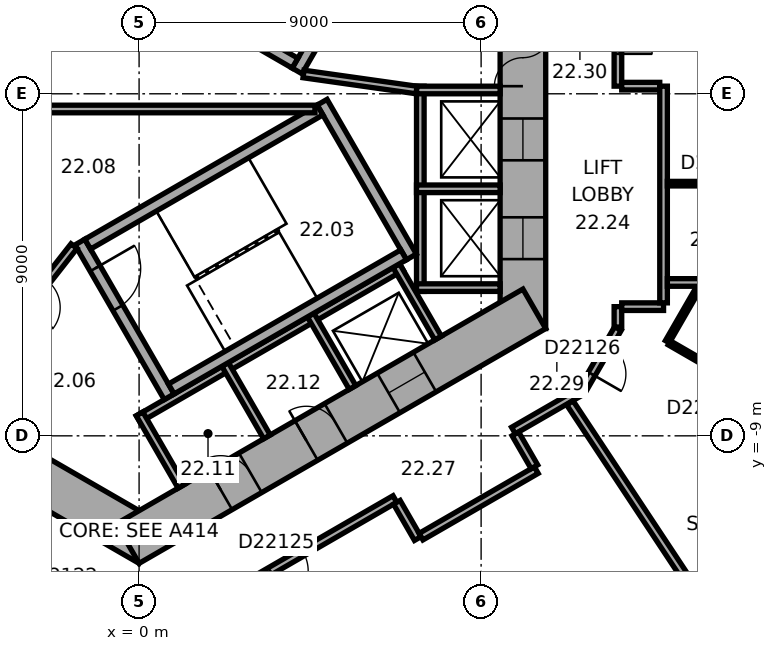
"""IFC4 building model, lengths in metres.
Left out: names, types, materials, properties, quantities, classifications, styles, units other than length and angle.
Written with IfcOpenShell. Run it as: python <this file> out.ifc"""

import sys

from ifc_helpers import new_model, si_unit, direction, frame, frame_2d, origin, place, context, subcontext, project, spatial, rectangle, extrude, element, fill, save


model = new_model("IFC4")
c1 = context("Model", 3, precision=1e-05, world=origin(), true_north=direction((0.0, 1.0)))
c2 = subcontext(c1, "Body", "Model", "MODEL_VIEW")
j1 = project(units=[si_unit("LENGTHUNIT", "METRE"), si_unit("PLANEANGLEUNIT", "RADIAN")], contexts=[c1])
p1 = place(None, origin())
s1 = spatial("IfcSite", under=j1, at=p1, CompositionType="ELEMENT")
p2 = place(p1, origin())
s2 = spatial("IfcBuilding", under=s1, at=p2, CompositionType="ELEMENT")
p3 = place(p2, frame((0.0, 0.0, 96.8)))
s3 = spatial("IfcBuildingStorey", under=s2, at=p3, CompositionType="ELEMENT", Elevation=96.8)
p4 = place(p3, frame((10.1, -6.177, 0.0), z_axis=(0.0, 0.0, 1.0), x_axis=(0.0, 1.0, 0.0)))
e1 = element("IfcWall", 1, at=p4, inside=s3, PredefinedType="SHEAR", context=c2, shape_type="SweptSolid", body=[
    extrude(rectangle(XDim=12.355, YDim=1.2, at=frame_2d((6.177, 0.0))), origin(), (0.0, 0.0, 1.0), 3.3),
])
p5 = place(p4, frame((6.378, 0.0, 0.0)))
e2 = element("IfcOpeningElement", 2, at=p5, cuts=e1, PredefinedType="OPENING", context=c2, shape_type="SweptSolid", body=[
    extrude(rectangle(XDim=1.5, YDim=2.1, at=frame_2d((0.75, 1.05))), frame((0.0, 0.61, 0.0), z_axis=(0.0, -1.0, 0.0), x_axis=(1.0, 0.0, 0.0)), (0.0, 0.0, 1.0), 1.22),
])
p6 = place(p4, frame((1.828, 0.0, 0.0)))
e3 = element("IfcOpeningElement", 3, at=p6, cuts=e1, PredefinedType="OPENING", context=c2, shape_type="SweptSolid", body=[
    extrude(rectangle(XDim=1.1, YDim=2.1, at=frame_2d((0.55, 1.05))), frame((0.0, 0.61, 0.0), z_axis=(0.0, -1.0, 0.0), x_axis=(1.0, 0.0, 0.0)), (0.0, 0.0, 1.0), 1.22),
])
p7 = place(p4, frame((4.427, 0.0, 0.0)))
e4 = element("IfcOpeningElement", 4, at=p7, cuts=e1, PredefinedType="OPENING", context=c2, shape_type="SweptSolid", body=[
    extrude(rectangle(XDim=1.1, YDim=2.1, at=frame_2d((0.55, 1.05))), frame((0.0, 0.61, 0.0), z_axis=(0.0, -1.0, 0.0), x_axis=(1.0, 0.0, 0.0)), (0.0, 0.0, 1.0), 1.22),
])
p8 = place(p3, frame((-10.4, -5.658, 0.0), z_axis=(0.0, 0.0, 1.0), x_axis=(0.866021384402, -0.500006961711, 0.0)))
e5 = element("IfcWall", 5, at=p8, inside=s3, PredefinedType="SHEAR", context=c2, shape_type="SweptSolid", body=[
    extrude(rectangle(XDim=12.355, YDim=1.2, at=frame_2d((6.178, 0.0))), origin(), (0.0, 0.0, 1.0), 3.3),
])
p9 = place(p8, frame((6.378, 0.0, 0.0)))
e6 = element("IfcOpeningElement", 6, at=p9, cuts=e5, PredefinedType="OPENING", context=c2, shape_type="SweptSolid", body=[
    extrude(rectangle(XDim=1.5, YDim=2.1, at=frame_2d((0.75, 1.05))), frame((0.0, 0.61, 0.0), z_axis=(0.0, -1.0, 0.0), x_axis=(1.0, 0.0, 0.0)), (0.0, 0.0, 1.0), 1.22),
])
p10 = place(p8, frame((3.228, 0.0, 0.0)))
e7 = element("IfcOpeningElement", 7, at=p10, cuts=e5, PredefinedType="OPENING", context=c2, shape_type="SweptSolid", body=[
    extrude(rectangle(XDim=0.9, YDim=2.1, at=frame_2d((0.45, 1.05))), frame((0.0, 0.61, 0.0), z_axis=(0.0, -1.0, 0.0), x_axis=(1.0, 0.0, 0.0)), (0.0, 0.0, 1.0), 1.22),
])
p11 = place(p3, frame((-0.3, -11.836, 0.0), z_axis=(0.0, 0.0, 1.0), x_axis=(0.866021384402, 0.500006961711, 0.0)))
e8 = element("IfcWall", 8, at=p11, inside=s3, PredefinedType="SHEAR", context=c2, shape_type="SweptSolid", body=[
    extrude(rectangle(XDim=12.355, YDim=1.2, at=frame_2d((6.178, 0.0))), origin(), (0.0, 0.0, 1.0), 3.3),
])
p12 = place(p11, frame((2.828, 0.0, 0.0)))
e9 = element("IfcOpeningElement", 9, at=p12, cuts=e8, PredefinedType="OPENING", context=c2, shape_type="SweptSolid", body=[
    extrude(rectangle(XDim=0.9, YDim=2.1, at=frame_2d((0.45, 1.05))), frame((0.0, 0.61, 0.0), z_axis=(0.0, -1.0, 0.0), x_axis=(1.0, 0.0, 0.0)), (0.0, 0.0, 1.0), 1.22),
])
p13 = place(p11, frame((5.428, 0.0, 0.0)))
e10 = element("IfcOpeningElement", 10, at=p13, cuts=e8, PredefinedType="OPENING", context=c2, shape_type="SweptSolid", body=[
    extrude(rectangle(XDim=0.9, YDim=2.1, at=frame_2d((0.45, 1.05))), frame((0.0, 0.61, 0.0), z_axis=(0.0, -1.0, 0.0), x_axis=(1.0, 0.0, 0.0)), (0.0, 0.0, 1.0), 1.22),
])
p14 = place(p11, frame((7.928, 0.0, 0.0)))
e11 = element("IfcOpeningElement", 11, at=p14, cuts=e8, PredefinedType="OPENING", context=c2, shape_type="SweptSolid", body=[
    extrude(rectangle(XDim=1.1, YDim=2.1, at=frame_2d((0.55, 1.05))), frame((0.0, 0.61, 0.0), z_axis=(0.0, -1.0, 0.0), x_axis=(1.0, 0.0, 0.0)), (0.0, 0.0, 1.0), 1.22),
])
p15 = place(p3, frame((7.4, -5.2, 0.0), z_axis=(0.0, 0.0, 1.0), x_axis=(0.0, 1.0, 0.0)))
e12 = element("IfcWall", 12, at=p15, inside=s3, PredefinedType="PARTITIONING", context=c2, shape_type="SweptSolid", body=[
    extrude(rectangle(XDim=5.4, YDim=0.2, at=frame_2d((2.7, 0.0))), origin(), (0.0, 0.0, 1.0), 3.05),
])
for number, where, z_axis, x_axis in (
    (13, (7.3, -5.1, 0.0), (0.0, 0.0, 1.0), (1.0, 0.0, 0.0)),
    (14, (7.3, -2.5, 0.0), (0.0, 0.0, 1.0), (1.0, 0.0, 0.0)),
    (15, (7.3, 0.1, 0.0), (0.0, 0.0, 1.0), (1.0, 0.0, 0.0)),
):
    element("IfcWall", number, at=place(p3, frame(where, z_axis=z_axis, x_axis=x_axis)), inside=s3, PredefinedType="PARTITIONING", context=c2, shape_type="SweptSolid", body=[
        extrude(rectangle(XDim=2.2, YDim=0.2, at=frame_2d((1.1, 0.0))), origin(), (0.0, 0.0, 1.0), 3.05),
    ])
p16 = place(p3, frame((-0.024, -8.559, 0.0), z_axis=(0.0, 0.0, 1.0), x_axis=(0.866026010844, 0.49999894854, 0.0)))
e16 = element("IfcWall", 16, at=p16, inside=s3, PredefinedType="PARTITIONING", context=c2, shape_type="SweptSolid", body=[
    extrude(rectangle(XDim=8.0, YDim=0.2, at=frame_2d((4.0, 0.0))), origin(), (0.0, 0.0, 1.0), 3.05),
])
for number, where, z_axis, x_axis in (
    (17, (0.013, -8.422, 0.0), (0.0, 0.0, 1.0), (0.5, -0.866, 0.0)),
    (18, (2.264, -7.122, 0.0), (0.0, 0.0, 1.0), (0.5, -0.866, 0.0)),
    (19, (4.516, -5.822, 0.0), (0.0, 0.0, 1.0), (0.5, -0.866, 0.0)),
    (20, (6.768, -4.522, 0.0), (0.0, 0.0, 1.0), (0.5, -0.866, 0.0)),
):
    element("IfcWall", number, at=place(p3, frame(where, z_axis=z_axis, x_axis=x_axis)), inside=s3, PredefinedType="PARTITIONING", context=c2, shape_type="SweptSolid", body=[
        extrude(rectangle(XDim=2.2, YDim=0.2, at=frame_2d((1.1, 0.0))), origin(), (0.0, 0.0, 1.0), 3.05),
    ])
p17 = place(p3, frame((4.158, 0.602, 0.0), z_axis=(0.0, 0.0, 1.0), x_axis=(0.499977259774, 0.866038532462, 0.0)))
e21 = element("IfcWall", 21, at=p17, inside=s3, PredefinedType="SHEAR", context=c2, shape_type="SweptSolid", body=[
    extrude(rectangle(XDim=4.7, YDim=0.3, at=frame_2d((2.35, 0.0))), origin(), (0.0, 0.0, 1.0), 3.05),
])
p18 = place(p17, frame((0.8, 0.0, 0.0)))
e22 = element("IfcOpeningElement", 22, at=p18, cuts=e21, PredefinedType="OPENING", context=c2, shape_type="SweptSolid", body=[
    extrude(rectangle(XDim=1.2, YDim=2.1, at=frame_2d((0.6, 1.05))), frame((0.0, 0.16, 0.0), z_axis=(0.0, -1.0, 0.0), x_axis=(1.0, 0.0, 0.0)), (0.0, 0.0, 1.0), 0.32),
])
p19 = place(p3, frame((4.103, 0.807, 0.0), z_axis=(0.0, 0.0, 1.0), x_axis=(-0.866027801685, 0.499995846692, 0.0)))
e23 = element("IfcWall", 23, at=p19, inside=s3, PredefinedType="SHEAR", context=c2, shape_type="SweptSolid", body=[
    extrude(rectangle(XDim=7.06, YDim=0.3, at=frame_2d((3.53, 0.0))), origin(), (0.0, 0.0, 1.0), 3.05),
])
p20 = place(p3, frame((-1.558, -3.902, 0.0), z_axis=(0.0, 0.0, 1.0), x_axis=(0.499977259774, -0.866038532462, 0.0)))
e24 = element("IfcWall", 24, at=p20, inside=s3, PredefinedType="SHEAR", context=c2, shape_type="SweptSolid", body=[
    extrude(rectangle(XDim=4.7, YDim=0.3, at=frame_2d((2.35, 0.0))), origin(), (0.0, 0.0, 1.0), 3.05),
])
p21 = place(p20, frame((0.8, 0.0, 0.0)))
e25 = element("IfcOpeningElement", 25, at=p21, cuts=e24, PredefinedType="OPENING", context=c2, shape_type="SweptSolid", body=[
    extrude(rectangle(XDim=1.2, YDim=2.1, at=frame_2d((0.6, 1.05))), frame((0.0, 0.16, 0.0), z_axis=(0.0, -1.0, 0.0), x_axis=(1.0, 0.0, 0.0)), (0.0, 0.0, 1.0), 0.32),
])
p22 = place(p3, frame((4.816, -0.222, 0.0), z_axis=(0.0, 0.0, 1.0), x_axis=(0.499977259774, -0.866038532462, 0.0)))
e26 = element("IfcWall", 26, at=p22, inside=s3, PredefinedType="SHEAR", context=c2, shape_type="SweptSolid", body=[
    extrude(rectangle(XDim=4.7, YDim=0.3, at=frame_2d((2.35, 0.0))), origin(), (0.0, 0.0, 1.0), 3.05),
])
for number, where, z_axis, x_axis in (
    (27, (-1.353, -3.957, 0.0), (0.0, 0.0, 1.0), (0.866, 0.5, 0.0)),
    (28, (0.847, -7.767, 0.0), (0.0, 0.0, 1.0), (0.866, 0.5, 0.0)),
):
    element("IfcWall", number, at=place(p3, frame(where, z_axis=z_axis, x_axis=x_axis)), inside=s3, PredefinedType="SHEAR", context=c2, shape_type="SweptSolid", body=[
        extrude(rectangle(XDim=7.06, YDim=0.3, at=frame_2d((3.53, 0.0))), origin(), (0.0, 0.0, 1.0), 3.05),
    ])
p23 = place(p3, frame((4.327, 0.521, 0.0), z_axis=(0.0, 0.0, 1.0), x_axis=(0.990124376366, -0.14019172346, 0.0)))
e29 = element("IfcWall", 29, at=p23, inside=s3, PredefinedType="PARTITIONING", context=c2, shape_type="SweptSolid", body=[
    extrude(rectangle(XDim=3.002, YDim=0.2, at=frame_2d((1.501, 0.0))), origin(), (0.0, 0.0, 1.0), 3.05),
])
p24 = place(p3, frame((-1.712, -4.008, 0.0), z_axis=(0.0, 0.0, 1.0), x_axis=(-0.616549420702, -0.787316208287, 0.0)))
e30 = element("IfcWall", 30, at=p24, inside=s3, PredefinedType="PARTITIONING", context=c2, shape_type="SweptSolid", body=[
    extrude(rectangle(XDim=3.002, YDim=0.2, at=frame_2d((1.501, 0.0))), origin(), (0.0, 0.0, 1.0), 3.05),
])
p25 = place(p24, frame((1.15, 0.0, 0.0)))
e31 = element("IfcOpeningElement", 31, at=p25, cuts=e30, PredefinedType="OPENING", context=c2, shape_type="SweptSolid", body=[
    extrude(rectangle(XDim=0.9, YDim=2.1, at=frame_2d((0.45, 1.05))), frame((0.0, 0.11, 0.0), z_axis=(0.0, -1.0, 0.0), x_axis=(1.0, 0.0, 0.0)), (0.0, 0.0, 1.0), 0.22),
])
p26 = place(p3, frame((-2.72, -0.4, 0.0), z_axis=(0.0, 0.0, 1.0), x_axis=(1.0, 0.0, 0.0)))
e32 = element("IfcWall", 32, at=p26, inside=s3, PredefinedType="PARTITIONING", context=c2, shape_type="SweptSolid", body=[
    extrude(rectangle(XDim=7.347, YDim=0.2, at=frame_2d((3.674, 0.0))), origin(), (0.0, 0.0, 1.0), 3.05),
])
p27 = place(p3, frame((-11.615, -7.843, 0.0), z_axis=(0.0, 0.0, 1.0), x_axis=(0.866026466995, -0.499998158461, 0.0)))
e33 = element("IfcWall", 33, at=p27, inside=s3, PredefinedType="PARTITIONING", context=c2, shape_type="SweptSolid", body=[
    extrude(rectangle(XDim=12.315, YDim=0.2, at=frame_2d((6.158, 0.0))), origin(), (0.0, 0.0, 1.0), 3.05),
])
p28 = place(p27, frame((3.333, 0.0, 0.0)))
e34 = element("IfcOpeningElement", 34, at=p28, cuts=e33, PredefinedType="OPENING", context=c2, shape_type="SweptSolid", body=[
    extrude(rectangle(XDim=0.9, YDim=2.1, at=frame_2d((0.45, 1.05))), frame((0.0, 0.11, 0.0), z_axis=(0.0, -1.0, 0.0), x_axis=(1.0, 0.0, 0.0)), (0.0, 0.0, 1.0), 0.22),
])
p29 = place(p27, frame((10.229, 0.0, 0.0)))
e35 = element("IfcOpeningElement", 35, at=p29, cuts=e33, PredefinedType="OPENING", context=c2, shape_type="SweptSolid", body=[
    extrude(rectangle(XDim=0.9, YDim=2.1, at=frame_2d((0.45, 1.05))), frame((0.0, 0.11, 0.0), z_axis=(0.0, -1.0, 0.0), x_axis=(1.0, 0.0, 0.0)), (0.0, 0.0, 1.0), 0.22),
])
p30 = place(p3, frame((1.033, -13.953, 0.0), z_axis=(0.0, 0.0, 1.0), x_axis=(0.866017531406, 0.500013635111, 0.0)))
e36 = element("IfcWall", 36, at=p30, inside=s3, PredefinedType="PARTITIONING", context=c2, shape_type="SweptSolid", body=[
    extrude(rectangle(XDim=6.58, YDim=0.2, at=frame_2d((3.29, 0.0))), origin(), (0.0, 0.0, 1.0), 3.05),
])
p31 = place(p30, frame((2.79, 0.0, 0.0)))
e37 = element("IfcOpeningElement", 37, at=p31, cuts=e36, PredefinedType="OPENING", context=c2, shape_type="SweptSolid", body=[
    extrude(rectangle(XDim=1.0, YDim=2.1, at=frame_2d((0.5, 1.05))), frame((0.0, 0.11, 0.0), z_axis=(0.0, -1.0, 0.0), x_axis=(1.0, 0.0, 0.0)), (0.0, 0.0, 1.0), 0.22),
])
p32 = place(p3, frame((6.782, -10.749, 0.0), z_axis=(0.0, 0.0, 1.0), x_axis=(0.500074377092, -0.865982457891, 0.0)))
e38 = element("IfcWall", 38, at=p32, inside=s3, PredefinedType="PARTITIONING", context=c2, shape_type="SweptSolid", body=[
    extrude(rectangle(XDim=1.101, YDim=0.2, at=frame_2d((0.55, 0.0))), origin(), (0.0, 0.0, 1.0), 3.05),
])
p33 = place(p3, frame((7.419, -11.653, 0.0), z_axis=(0.0, 0.0, 1.0), x_axis=(0.866038154057, 0.49997791523, 0.0)))
e39 = element("IfcWall", 39, at=p33, inside=s3, PredefinedType="PARTITIONING", context=c2, shape_type="SweptSolid", body=[
    extrude(rectangle(XDim=3.502, YDim=0.2, at=frame_2d((1.751, 0.0))), origin(), (0.0, 0.0, 1.0), 3.05),
])
p34 = place(p3, frame((9.852, -8.861, 0.0), z_axis=(0.0, 0.0, 1.0), x_axis=(0.866013291437, 0.500020978615, 0.0)))
e40 = element("IfcWall", 40, at=p34, inside=s3, PredefinedType="PARTITIONING", context=c2, shape_type="SweptSolid", body=[
    extrude(rectangle(XDim=2.077, YDim=0.2, at=frame_2d((1.038, 0.0))), origin(), (0.0, 0.0, 1.0), 3.05),
])
p35 = place(p3, frame((10.402, -9.815, 0.0), z_axis=(0.0, 0.0, 1.0), x_axis=(-0.499968756647, 0.866043441391, 0.0)))
e41 = element("IfcWall", 41, at=p35, inside=s3, PredefinedType="PARTITIONING", context=c2, shape_type="SweptSolid", body=[
    extrude(rectangle(XDim=1.001, YDim=0.2, at=frame_2d((0.5, 0.0))), origin(), (0.0, 0.0, 1.0), 3.05),
])
p36 = place(p3, frame((11.67, -7.788, 0.0), z_axis=(0.0, 0.0, 1.0), x_axis=(0.500063286585, 0.865988862174, 0.0)))
e42 = element("IfcWall", 42, at=p36, inside=s3, PredefinedType="PARTITIONING", context=c2, shape_type="SweptSolid", body=[
    extrude(rectangle(XDim=1.86, YDim=0.2, at=frame_2d((0.93, 0.0))), origin(), (0.0, 0.0, 1.0), 3.05),
])
p37 = place(p36, frame((0.48, 0.0, 0.0)))
e43 = element("IfcOpeningElement", 43, at=p37, cuts=e42, PredefinedType="OPENING", context=c2, shape_type="SweptSolid", body=[
    extrude(rectangle(XDim=0.9, YDim=2.1, at=frame_2d((0.45, 1.05))), frame((0.0, 0.11, 0.0), z_axis=(0.0, -1.0, 0.0), x_axis=(1.0, 0.0, 0.0)), (0.0, 0.0, 1.0), 0.22),
])
p38 = place(p3, frame((12.6, -6.138, 0.0), z_axis=(0.0, 0.0, 1.0), x_axis=(0.0, 1.0, 0.0)))
e44 = element("IfcWall", 44, at=p38, inside=s3, PredefinedType="PARTITIONING", context=c2, shape_type="SweptSolid", body=[
    extrude(rectangle(XDim=0.537, YDim=0.2, at=frame_2d((0.268, 0.0))), origin(), (0.0, 0.0, 1.0), 3.05),
])
p39 = place(p3, frame((12.6, 0.201, 0.0), z_axis=(0.0, 0.0, 1.0), x_axis=(0.0, 1.0, 0.0)))
e45 = element("IfcWall", 45, at=p39, inside=s3, PredefinedType="PARTITIONING", context=c2, shape_type="SweptSolid", body=[
    extrude(rectangle(XDim=2.604, YDim=0.2, at=frame_2d((1.302, 0.0))), origin(), (0.0, 0.0, 1.0), 3.05),
])
p40 = place(p39, frame((0.852, 0.0, 0.0)))
e46 = element("IfcOpeningElement", 46, at=p40, cuts=e45, PredefinedType="OPENING", context=c2, shape_type="SweptSolid", body=[
    extrude(rectangle(XDim=0.9, YDim=2.1, at=frame_2d((0.45, 1.05))), frame((0.0, 0.11, 0.0), z_axis=(0.0, -1.0, 0.0), x_axis=(1.0, 0.0, 0.0)), (0.0, 0.0, 1.0), 0.22),
])
p41 = place(p3, frame((12.7, -5.601, 0.0), z_axis=(0.0, 0.0, 1.0), x_axis=(1.0, 0.0, 0.0)))
e47 = element("IfcWall", 47, at=p41, inside=s3, PredefinedType="PARTITIONING", context=c2, shape_type="SweptSolid", body=[
    extrude(rectangle(XDim=1.101, YDim=0.2, at=frame_2d((0.551, 0.0))), origin(), (0.0, 0.0, 1.0), 3.05),
])
p42 = place(p3, frame((13.701, 0.201, 0.0), z_axis=(0.0, 0.0, 1.0), x_axis=(-1.0, 0.0, 0.0)))
e48 = element("IfcWall", 48, at=p42, inside=s3, PredefinedType="PARTITIONING", context=c2, shape_type="SweptSolid", body=[
    extrude(rectangle(XDim=1.001, YDim=0.2, at=frame_2d((0.5, 0.0))), origin(), (0.0, 0.0, 1.0), 3.05),
])
p43 = place(p3, frame((13.801, -5.501, 0.0), z_axis=(0.0, 0.0, 1.0), x_axis=(0.0, 1.0, 0.0)))
e49 = element("IfcWall", 49, at=p43, inside=s3, PredefinedType="PARTITIONING", context=c2, shape_type="SweptSolid", body=[
    extrude(rectangle(XDim=5.702, YDim=0.2, at=frame_2d((2.851, 0.0))), origin(), (0.0, 0.0, 1.0), 3.05),
])
p44 = place(p3, frame((13.901, -6.524, 0.0), z_axis=(0.0, 0.0, 1.0), x_axis=(0.499964162598, 0.86604609353, 0.0)))
e50 = element("IfcWall", 50, at=p44, inside=s3, PredefinedType="PARTITIONING", context=c2, shape_type="SweptSolid", body=[
    extrude(rectangle(XDim=1.661, YDim=0.12, at=frame_2d((0.831, 0.0))), origin(), (0.0, 0.0, 1.0), 3.05),
])
p45 = place(p3, frame((13.901, -4.965, 0.0), z_axis=(0.0, 0.0, 1.0), x_axis=(1.0, 0.0, 0.0)))
e51 = element("IfcWall", 51, at=p45, inside=s3, PredefinedType="PARTITIONING", context=c2, shape_type="SweptSolid", body=[
    extrude(rectangle(XDim=8.049, YDim=0.2, at=frame_2d((4.024, 0.0))), origin(), (0.0, 0.0, 1.0), 3.05),
])
p46 = place(p3, frame((13.901, -2.365, 0.0), z_axis=(0.0, 0.0, 1.0), x_axis=(1.0, 0.0, 0.0)))
e52 = element("IfcWall", 52, at=p46, inside=s3, PredefinedType="PARTITIONING", context=c2, shape_type="SweptSolid", body=[
    extrude(rectangle(XDim=2.7, YDim=0.12, at=frame_2d((1.35, 0.0))), origin(), (0.0, 0.0, 1.0), 3.05),
])
p47 = place(p46, frame((0.9, 0.0, 0.0)))
e53 = element("IfcOpeningElement", 53, at=p47, cuts=e52, PredefinedType="OPENING", context=c2, shape_type="SweptSolid", body=[
    extrude(rectangle(XDim=0.9, YDim=2.1, at=frame_2d((0.45, 1.05))), frame((0.0, 0.07, 0.0), z_axis=(0.0, -1.0, 0.0), x_axis=(1.0, 0.0, 0.0)), (0.0, 0.0, 1.0), 0.14),
])
p48 = place(p3, frame((16.255, -15.564, 0.0), z_axis=(0.0, 0.0, 1.0), x_axis=(-0.55192208744, 0.833895682562, 0.0)))
e54 = element("IfcWall", 54, at=p48, inside=s3, PredefinedType="PARTITIONING", context=c2, shape_type="SweptSolid", body=[
    extrude(rectangle(XDim=8.913, YDim=0.2, at=frame_2d((4.457, 0.0))), origin(), (0.0, 0.0, 1.0), 2.6),
])
p49 = place(p3, frame((16.326, -7.925, 0.0), z_axis=(0.0, 0.0, 1.0), x_axis=(-0.865997131366, 0.500048966069, 0.0)))
e55 = element("IfcWall", 55, at=p49, inside=s3, PredefinedType="PARTITIONING", context=c2, shape_type="SweptSolid", body=[
    extrude(rectangle(XDim=2.74, YDim=0.12, at=frame_2d((1.37, 0.0))), origin(), (0.0, 0.0, 1.0), 3.05),
])
p50 = place(p49, frame((0.92, 0.0, 0.0)))
e56 = element("IfcOpeningElement", 56, at=p50, cuts=e55, PredefinedType="OPENING", context=c2, shape_type="SweptSolid", body=[
    extrude(rectangle(XDim=0.9, YDim=2.1, at=frame_2d((0.45, 1.05))), frame((0.0, 0.07, 0.0), z_axis=(0.0, -1.0, 0.0), x_axis=(1.0, 0.0, 0.0)), (0.0, 0.0, 1.0), 0.14),
])
p51 = place(p5, origin())
e57 = element("IfcDoor", 57, at=p51, inside=s3, OperationType="DOUBLE_DOOR_SINGLE_SWING", PredefinedType="DOOR", context=c2, shape_type="SweptSolid", body=[
    extrude(rectangle(XDim=1.5, YDim=2.1, at=frame_2d((0.75, 1.05))), frame((0.0, 0.025, 0.0), z_axis=(0.0, -1.0, 0.0), x_axis=(1.0, 0.0, 0.0)), (0.0, 0.0, 1.0), 0.05),
])
fill(e2, e57)
p52 = place(p21, origin())
e58 = element("IfcDoor", 58, at=p52, inside=s3, OperationType="SINGLE_SWING_RIGHT", PredefinedType="DOOR", context=c2, shape_type="SweptSolid", body=[
    extrude(rectangle(XDim=1.2, YDim=2.1, at=frame_2d((0.6, 1.05))), frame((0.0, 0.025, 0.0), z_axis=(0.0, -1.0, 0.0), x_axis=(1.0, 0.0, 0.0)), (0.0, 0.0, 1.0), 0.05),
])
fill(e25, e58)
p53 = place(p12, origin())
e59 = element("IfcDoor", 59, at=p53, inside=s3, OperationType="SINGLE_SWING_LEFT", PredefinedType="DOOR", context=c2, shape_type="SweptSolid", body=[
    extrude(rectangle(XDim=0.9, YDim=2.1, at=frame_2d((0.45, 1.05))), frame((0.0, 0.025, 0.0), z_axis=(0.0, -1.0, 0.0), x_axis=(1.0, 0.0, 0.0)), (0.0, 0.0, 1.0), 0.05),
])
fill(e9, e59)
p54 = place(p13, origin())
e60 = element("IfcDoor", 60, at=p54, inside=s3, OperationType="SINGLE_SWING_LEFT", PredefinedType="DOOR", context=c2, shape_type="SweptSolid", body=[
    extrude(rectangle(XDim=0.9, YDim=2.1, at=frame_2d((0.45, 1.05))), frame((0.0, 0.025, 0.0), z_axis=(0.0, -1.0, 0.0), x_axis=(1.0, 0.0, 0.0)), (0.0, 0.0, 1.0), 0.05),
])
fill(e10, e60)
p55 = place(p6, origin())
e61 = element("IfcDoor", 61, at=p55, inside=s3, OperationType="DOUBLE_DOOR_SLIDING", PredefinedType="DOOR", context=c2, shape_type="SweptSolid", body=[
    extrude(rectangle(XDim=1.1, YDim=2.1, at=frame_2d((0.55, 1.05))), frame((0.0, 0.025, 0.0), z_axis=(0.0, -1.0, 0.0), x_axis=(1.0, 0.0, 0.0)), (0.0, 0.0, 1.0), 0.05),
])
fill(e3, e61)
p56 = place(p7, origin())
e62 = element("IfcDoor", 62, at=p56, inside=s3, OperationType="DOUBLE_DOOR_SLIDING", PredefinedType="DOOR", context=c2, shape_type="SweptSolid", body=[
    extrude(rectangle(XDim=1.1, YDim=2.1, at=frame_2d((0.55, 1.05))), frame((0.0, 0.025, 0.0), z_axis=(0.0, -1.0, 0.0), x_axis=(1.0, 0.0, 0.0)), (0.0, 0.0, 1.0), 0.05),
])
fill(e4, e62)
p57 = place(p14, origin())
e63 = element("IfcDoor", 63, at=p57, inside=s3, OperationType="DOUBLE_DOOR_SLIDING", PredefinedType="DOOR", context=c2, shape_type="SweptSolid", body=[
    extrude(rectangle(XDim=1.1, YDim=2.1, at=frame_2d((0.55, 1.05))), frame((0.0, 0.025, 0.0), z_axis=(0.0, -1.0, 0.0), x_axis=(1.0, 0.0, 0.0)), (0.0, 0.0, 1.0), 0.05),
])
fill(e11, e63)
p58 = place(p40, origin())
e64 = element("IfcDoor", 64, at=p58, inside=s3, OperationType="SINGLE_SWING_LEFT", PredefinedType="DOOR", context=c2, shape_type="SweptSolid", body=[
    extrude(rectangle(XDim=0.9, YDim=2.1, at=frame_2d((0.45, 1.05))), frame((0.0, 0.025, 0.0), z_axis=(0.0, -1.0, 0.0), x_axis=(1.0, 0.0, 0.0)), (0.0, 0.0, 1.0), 0.05),
])
fill(e46, e64)
p59 = place(p31, origin())
e65 = element("IfcDoor", 65, at=p59, inside=s3, OperationType="SINGLE_SWING_LEFT", PredefinedType="DOOR", context=c2, shape_type="SweptSolid", body=[
    extrude(rectangle(XDim=1.0, YDim=2.1, at=frame_2d((0.5, 1.05))), frame((0.0, 0.025, 0.0), z_axis=(0.0, -1.0, 0.0), x_axis=(1.0, 0.0, 0.0)), (0.0, 0.0, 1.0), 0.05),
])
fill(e37, e65)
p60 = place(p37, origin())
e66 = element("IfcDoor", 66, at=p60, inside=s3, OperationType="SINGLE_SWING_LEFT", PredefinedType="DOOR", context=c2, shape_type="SweptSolid", body=[
    extrude(rectangle(XDim=0.9, YDim=2.1, at=frame_2d((0.45, 1.05))), frame((0.0, 0.025, 0.0), z_axis=(0.0, -1.0, 0.0), x_axis=(1.0, 0.0, 0.0)), (0.0, 0.0, 1.0), 0.05),
])
fill(e43, e66)
save(model, sys.argv[1])
